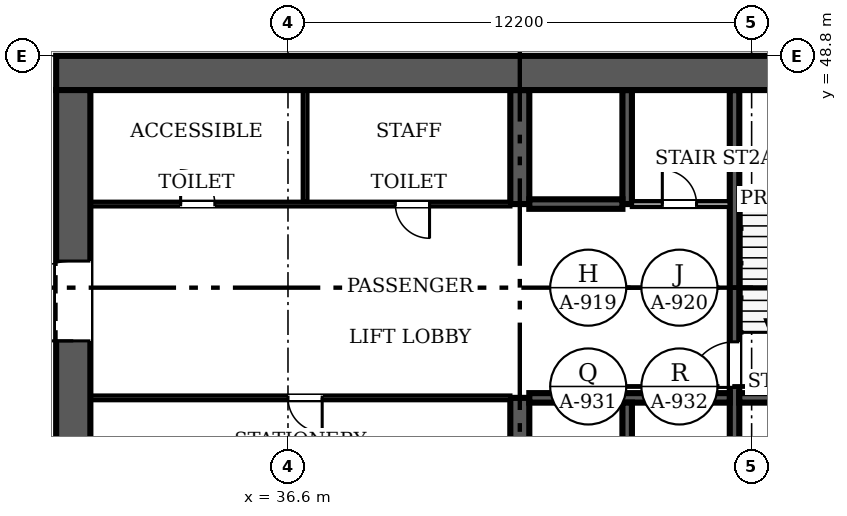
"""IFC4 building model, lengths in metres.
Left out: names, types, materials, properties, quantities, classifications, styles, units other than length and angle.
Written with IfcOpenShell. Run it as: python <this file> out.ifc"""

import sys

from ifc_helpers import new_model, si_unit, direction, frame, frame_2d, origin, place, context, subcontext, project, spatial, rectangle, extrude, source, transform, mapped, element, fill, save


model = new_model("IFC4")
c1 = context("Model", 3, precision=1e-05, world=origin(), true_north=direction((0.0, 1.0)))
c2 = subcontext(c1, "Body", "Model", "MODEL_VIEW")
j1 = project(units=[si_unit("LENGTHUNIT", "METRE"), si_unit("PLANEANGLEUNIT", "RADIAN")], contexts=[c1])
p1 = place(None, origin())
s1 = spatial("IfcSite", under=j1, at=p1, CompositionType="ELEMENT")
p2 = place(p1, origin())
s2 = spatial("IfcBuilding", under=s1, at=p2, CompositionType="ELEMENT")
p3 = place(p2, frame((0.0, 0.0, 12.0)))
s3 = spatial("IfcBuildingStorey", under=s2, at=p3, CompositionType="ELEMENT", Elevation=12.0)
p4 = place(p3, frame((30.95, 25.3, 0.0), z_axis=(0.0, 0.0, 1.0), x_axis=(0.0, 1.0, 0.0)))
e1 = element("IfcWall", 1, at=p4, inside=s3, PredefinedType="SHEAR", context=c2, shape_type="SweptSolid", body=[
    extrude(rectangle(XDim=22.6, YDim=0.9, at=frame_2d((11.3, 0.0))), origin(), (0.0, 0.0, 1.0), 4.8),
])
m1 = source(origin(), c2, "Body", "SweptSolid", [
    extrude(rectangle(XDim=2.1, YDim=2.4, at=frame_2d((1.05, 1.2))), frame((0.0, 0.46, 0.0), z_axis=(0.0, -1.0, 0.0), x_axis=(1.0, 0.0, 0.0)), (0.0, 0.0, 1.0), 0.92),
])
p5 = place(p4, frame((4.5, 0.0, 0.0)))
e2 = element("IfcOpeningElement", 2, at=p5, cuts=e1, PredefinedType="OPENING", context=c2, shape_type="MappedRepresentation", body=[
    mapped(m1, transform((0.0, 0.0, 0.0), scale=1.0)),
])
p6 = place(p4, frame((16.0, 0.0, 0.0)))
e3 = element("IfcOpeningElement", 3, at=p6, cuts=e1, PredefinedType="OPENING", context=c2, shape_type="MappedRepresentation", body=[
    mapped(m1, transform((0.0, 0.0, 0.0), scale=1.0)),
])
p7 = place(p3, frame((30.5, 48.35, 0.0), z_axis=(0.0, 0.0, 1.0), x_axis=(1.0, 0.0, 0.0)))
e4 = element("IfcWall", 4, at=p7, inside=s3, PredefinedType="SHEAR", context=c2, shape_type="SweptSolid", body=[
    extrude(rectangle(XDim=24.4, YDim=0.9, at=frame_2d((12.2, 0.0))), origin(), (0.0, 0.0, 1.0), 4.8),
])
p8 = place(p3, frame((42.7, 36.85, 0.0), z_axis=(0.0, 0.0, 1.0), x_axis=(0.0, 1.0, 0.0)))
e5 = element("IfcWall", 5, at=p8, inside=s3, PredefinedType="SHEAR", context=c2, shape_type="SweptSolid", body=[
    extrude(rectangle(XDim=2.95, YDim=0.5, at=frame_2d((1.475, 0.0))), origin(), (0.0, 0.0, 1.0), 4.8),
])
p9 = place(p3, frame((42.7, 44.9, 0.0), z_axis=(0.0, 0.0, 1.0), x_axis=(0.0, 1.0, 0.0)))
e6 = element("IfcWall", 6, at=p9, inside=s3, PredefinedType="SHEAR", context=c2, shape_type="SweptSolid", body=[
    extrude(rectangle(XDim=3.0, YDim=0.5, at=frame_2d((1.5, 0.0))), origin(), (0.0, 0.0, 1.0), 4.8),
])
p10 = place(p3, frame((48.35, 47.9, 0.0), z_axis=(0.0, 0.0, 1.0), x_axis=(0.0, -1.0, 0.0)))
e7 = element("IfcWall", 7, at=p10, inside=s3, PredefinedType="SOLIDWALL", context=c2, shape_type="SweptSolid", body=[
    extrude(rectangle(XDim=11.05, YDim=0.25, at=frame_2d((5.525, 0.0))), origin(), (0.0, 0.0, 1.0), 4.8),
])
m2 = source(origin(), c2, "Body", "SweptSolid", [
    extrude(rectangle(XDim=1.2, YDim=2.1, at=frame_2d((0.6, 1.05))), frame((0.0, 0.135, 0.0), z_axis=(0.0, -1.0, 0.0), x_axis=(1.0, 0.0, 0.0)), (0.0, 0.0, 1.0), 0.27),
])
p11 = place(p10, frame((6.625, 0.0, 0.0)))
e8 = element("IfcOpeningElement", 8, at=p11, cuts=e7, PredefinedType="OPENING", context=c2, shape_type="MappedRepresentation", body=[
    mapped(m2, transform((0.0, 0.0, 0.0), scale=1.0)),
])
p12 = place(p3, frame((42.95, 39.8, 0.0), z_axis=(0.0, 0.0, 1.0), x_axis=(1.0, 0.0, 0.0)))
e9 = element("IfcWall", 9, at=p12, inside=s3, PredefinedType="SOLIDWALL", context=c2, shape_type="SweptSolid", body=[
    extrude(rectangle(XDim=5.275, YDim=0.25, at=frame_2d((2.638, 0.0))), origin(), (0.0, 0.0, 1.0), 4.8),
])
p13 = place(p3, frame((48.475, 39.8, 0.0), z_axis=(0.0, 0.0, 1.0), x_axis=(1.0, 0.0, 0.0)))
e10 = element("IfcWall", 10, at=p13, inside=s3, PredefinedType="SOLIDWALL", context=c2, shape_type="SweptSolid", body=[
    extrude(rectangle(XDim=3.525, YDim=0.25, at=frame_2d((1.762, 0.0))), origin(), (0.0, 0.0, 1.0), 4.8),
])
p14 = place(p3, frame((45.525, 36.85, 0.0), z_axis=(0.0, 0.0, 1.0), x_axis=(0.0, 1.0, 0.0)))
e11 = element("IfcWall", 11, at=p14, inside=s3, PredefinedType="SOLIDWALL", context=c2, shape_type="SweptSolid", body=[
    extrude(rectangle(XDim=2.825, YDim=0.25, at=frame_2d((1.413, 0.0))), origin(), (0.0, 0.0, 1.0), 4.8),
])
p15 = place(p3, frame((45.525, 44.9, 0.0), z_axis=(0.0, 0.0, 1.0), x_axis=(0.0, 1.0, 0.0)))
e12 = element("IfcWall", 12, at=p15, inside=s3, PredefinedType="SOLIDWALL", context=c2, shape_type="SweptSolid", body=[
    extrude(rectangle(XDim=3.0, YDim=0.25, at=frame_2d((1.5, 0.0))), origin(), (0.0, 0.0, 1.0), 4.8),
])
p16 = place(p3, frame((42.95, 44.9, 0.0), z_axis=(0.0, 0.0, 1.0), x_axis=(1.0, 0.0, 0.0)))
e13 = element("IfcWall", 13, at=p16, inside=s3, PredefinedType="SOLIDWALL", context=c2, shape_type="SweptSolid", body=[
    extrude(rectangle(XDim=2.45, YDim=0.25, at=frame_2d((1.225, 0.0))), origin(), (0.0, 0.0, 1.0), 4.8),
])
p17 = place(p3, frame((42.45, 39.8, 0.0), z_axis=(0.0, 0.0, 1.0), x_axis=(-1.0, 0.0, 0.0)))
e14 = element("IfcWall", 14, at=p17, inside=s3, PredefinedType="PARTITIONING", context=c2, shape_type="SweptSolid", body=[
    extrude(rectangle(XDim=11.05, YDim=0.12, at=frame_2d((5.525, 0.0))), origin(), (0.0, 0.0, 1.0), 4.6),
])
m3 = source(origin(), c2, "Body", "SweptSolid", [
    extrude(rectangle(XDim=0.9, YDim=2.1, at=frame_2d((0.45, 1.05))), frame((0.0, 0.07, 0.0), z_axis=(0.0, -1.0, 0.0), x_axis=(1.0, 0.0, 0.0)), (0.0, 0.0, 1.0), 0.14),
])
p18 = place(p17, frame((4.95, 0.0, 0.0)))
e15 = element("IfcOpeningElement", 15, at=p18, cuts=e14, PredefinedType="OPENING", context=c2, shape_type="MappedRepresentation", body=[
    mapped(m3, transform((0.0, 0.0, 0.0), scale=1.0)),
])
p19 = place(p3, frame((31.4, 44.9, 0.0), z_axis=(0.0, 0.0, 1.0), x_axis=(1.0, 0.0, 0.0)))
e16 = element("IfcWall", 16, at=p19, inside=s3, PredefinedType="PARTITIONING", context=c2, shape_type="SweptSolid", body=[
    extrude(rectangle(XDim=11.05, YDim=0.12, at=frame_2d((5.525, 0.0))), origin(), (0.0, 0.0, 1.0), 4.6),
])
p20 = place(p19, frame((2.375, 0.0, 0.0)))
e17 = element("IfcOpeningElement", 17, at=p20, cuts=e16, PredefinedType="OPENING", context=c2, shape_type="MappedRepresentation", body=[
    mapped(m3, transform((0.0, 0.0, 0.0), scale=1.0)),
])
p21 = place(p19, frame((8.025, 0.0, 0.0)))
e18 = element("IfcOpeningElement", 18, at=p21, cuts=e16, PredefinedType="OPENING", context=c2, shape_type="MappedRepresentation", body=[
    mapped(m3, transform((0.0, 0.0, 0.0), scale=1.0)),
])
p22 = place(p3, frame((37.05, 44.96, 0.0), z_axis=(0.0, 0.0, 1.0), x_axis=(0.0, 1.0, 0.0)))
e19 = element("IfcWall", 19, at=p22, inside=s3, PredefinedType="PARTITIONING", context=c2, shape_type="SweptSolid", body=[
    extrude(rectangle(XDim=2.94, YDim=0.12, at=frame_2d((1.47, 0.0))), origin(), (0.0, 0.0, 1.0), 4.6),
])
p23 = place(p3, frame((45.65, 44.9, 0.0), z_axis=(0.0, 0.0, 1.0), x_axis=(1.0, 0.0, 0.0)))
e20 = element("IfcWall", 20, at=p23, inside=s3, PredefinedType="PARTITIONING", context=c2, shape_type="SweptSolid", body=[
    extrude(rectangle(XDim=2.575, YDim=0.15, at=frame_2d((1.288, 0.0))), origin(), (0.0, 0.0, 1.0), 4.6),
])
m4 = source(origin(), c2, "Body", "SweptSolid", [
    extrude(rectangle(XDim=0.9, YDim=2.1, at=frame_2d((0.45, 1.05))), frame((0.0, 0.085, 0.0), z_axis=(0.0, -1.0, 0.0), x_axis=(1.0, 0.0, 0.0)), (0.0, 0.0, 1.0), 0.17),
])
p24 = place(p23, frame((0.8, 0.0, 0.0)))
e21 = element("IfcOpeningElement", 21, at=p24, cuts=e20, PredefinedType="OPENING", context=c2, shape_type="MappedRepresentation", body=[
    mapped(m4, transform((0.0, 0.0, 0.0), scale=1.0)),
])
m5 = source(origin(), c2, "Body", "SweptSolid", [
    extrude(rectangle(XDim=2.1, YDim=2.4, at=frame_2d((1.05, 1.2))), frame((0.0, 0.025, 0.0), z_axis=(0.0, -1.0, 0.0), x_axis=(1.0, 0.0, 0.0)), (0.0, 0.0, 1.0), 0.05),
])
p25 = place(p6, origin())
e22 = element("IfcDoor", 22, at=p25, inside=s3, OperationType="DOUBLE_DOOR_SINGLE_SWING", PredefinedType="DOOR", context=c2, shape_type="MappedRepresentation", body=[
    mapped(m5, transform((0.0, 0.0, 0.0), scale=1.0)),
])
fill(e3, e22)
m6 = source(origin(), c2, "Body", "SweptSolid", [
    extrude(rectangle(XDim=1.2, YDim=2.1, at=frame_2d((0.6, 1.05))), frame((0.0, 0.025, 0.0), z_axis=(0.0, -1.0, 0.0), x_axis=(1.0, 0.0, 0.0)), (0.0, 0.0, 1.0), 0.05),
])
p26 = place(p11, origin())
e23 = element("IfcDoor", 23, at=p26, inside=s3, OperationType="SINGLE_SWING_RIGHT", PredefinedType="DOOR", context=c2, shape_type="MappedRepresentation", body=[
    mapped(m6, transform((0.0, 0.0, 0.0), scale=1.0)),
])
fill(e8, e23)
m7 = source(origin(), c2, "Body", "SweptSolid", [
    extrude(rectangle(XDim=0.9, YDim=2.1, at=frame_2d((0.45, 1.05))), frame((0.0, 0.025, 0.0), z_axis=(0.0, -1.0, 0.0), x_axis=(1.0, 0.0, 0.0)), (0.0, 0.0, 1.0), 0.05),
])
p27 = place(p18, origin())
e24 = element("IfcDoor", 24, at=p27, inside=s3, OperationType="SINGLE_SWING_LEFT", PredefinedType="DOOR", context=c2, shape_type="MappedRepresentation", body=[
    mapped(m7, transform((0.0, 0.0, 0.0), scale=1.0)),
])
fill(e15, e24)
p28 = place(p20, origin())
e25 = element("IfcDoor", 25, at=p28, inside=s3, OperationType="SINGLE_SWING_LEFT", PredefinedType="DOOR", context=c2, shape_type="MappedRepresentation", body=[
    mapped(m7, transform((0.0, 0.0, 0.0), scale=1.0)),
])
fill(e17, e25)
p29 = place(p21, origin())
e26 = element("IfcDoor", 26, at=p29, inside=s3, OperationType="SINGLE_SWING_RIGHT", PredefinedType="DOOR", context=c2, shape_type="MappedRepresentation", body=[
    mapped(m7, transform((0.0, 0.0, 0.0), scale=1.0)),
])
fill(e18, e26)
p30 = place(p24, origin())
e27 = element("IfcDoor", 27, at=p30, inside=s3, OperationType="SINGLE_SWING_LEFT", PredefinedType="DOOR", context=c2, shape_type="MappedRepresentation", body=[
    mapped(m7, transform((0.0, 0.0, 0.0), scale=1.0)),
])
fill(e21, e27)
save(model, sys.argv[1])
